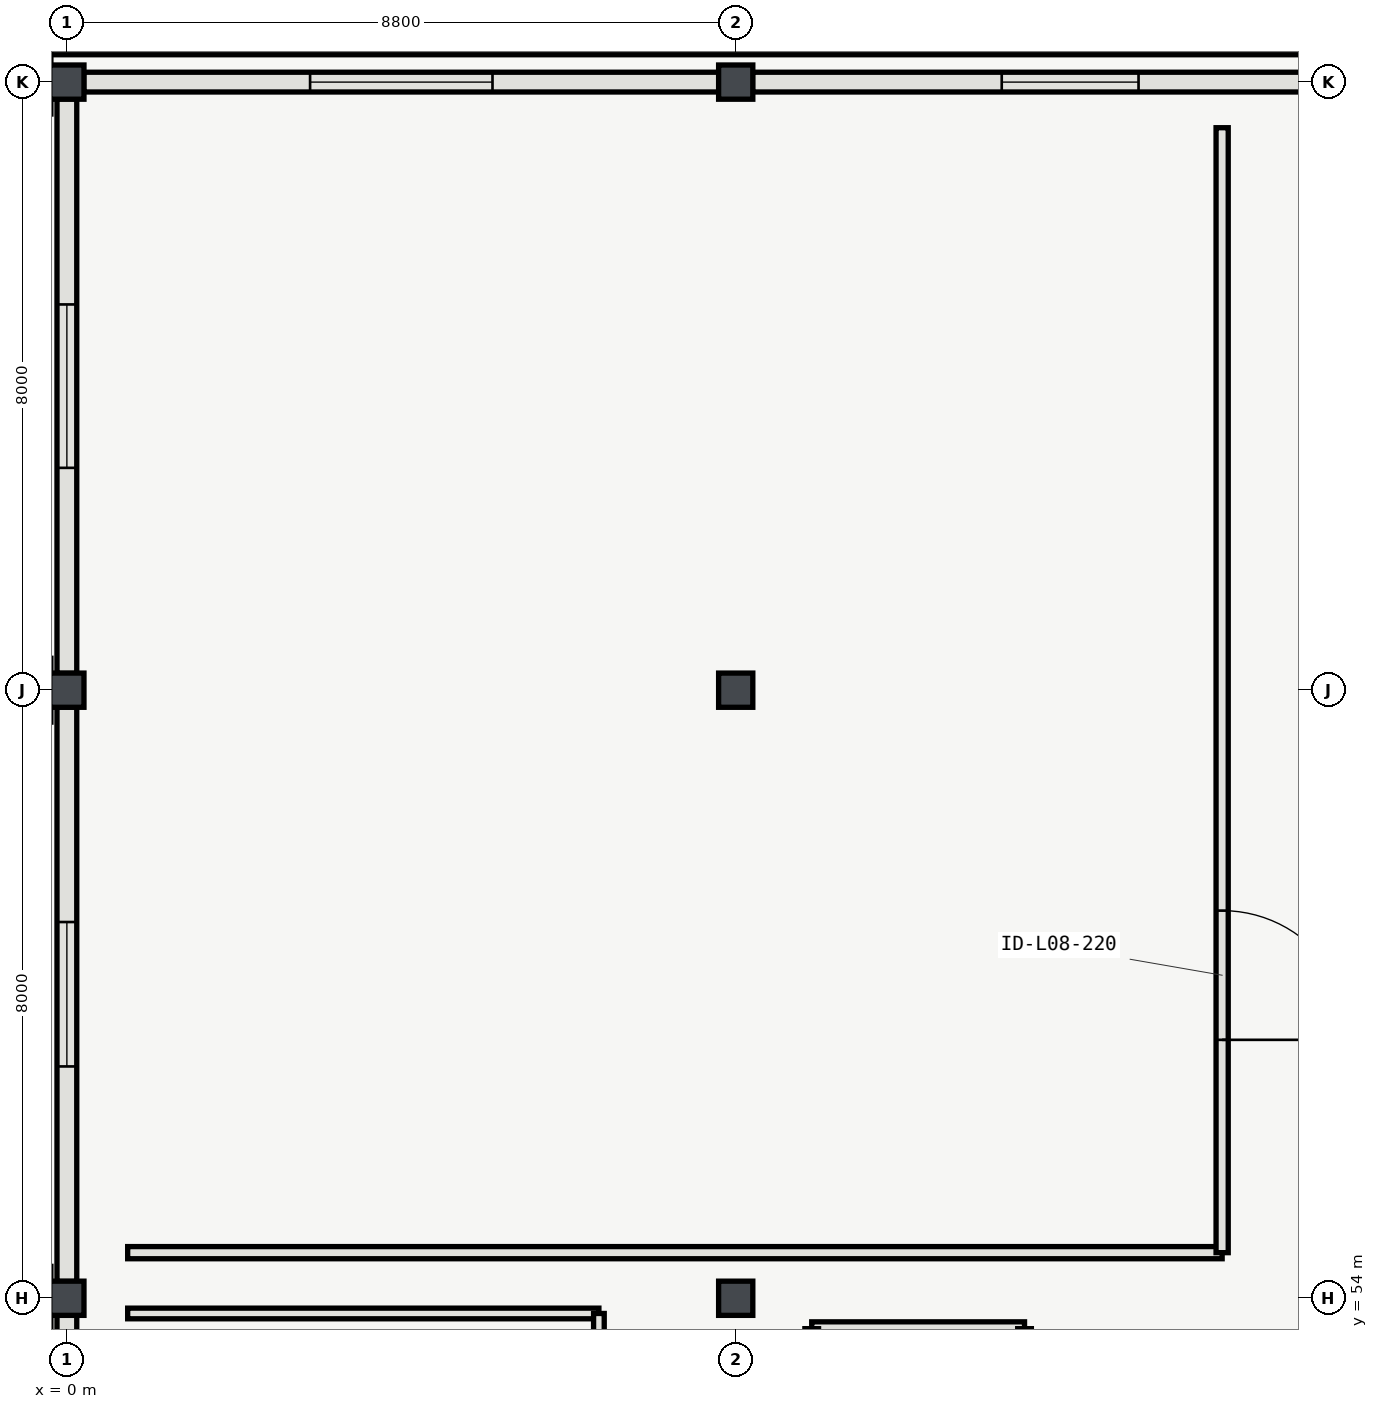
"""IFC4 building model, lengths in metres.
Left out: names, types, materials, properties, quantities, classifications, styles, units other than length and angle.
Written with IfcOpenShell. Run it as: python <this file> out.ifc"""

import sys

from ifc_helpers import new_model, si_unit, direction, frame, frame_2d, origin, origin_2d, place, context, subcontext, project, spatial, rectangle, hollow_rectangle, extrude, element, fill, save


model = new_model("IFC4")
c1 = context("Model", 3, precision=1e-05, world=origin(), true_north=direction((0.0, 1.0)))
c2 = subcontext(c1, "Body", "Model", "MODEL_VIEW")
j1 = project(units=[si_unit("LENGTHUNIT", "METRE"), si_unit("PLANEANGLEUNIT", "RADIAN")], contexts=[c1])
p1 = place(None, origin())
s1 = spatial("IfcSite", under=j1, at=p1, CompositionType="ELEMENT")
p2 = place(p1, origin())
s2 = spatial("IfcBuilding", under=s1, at=p2, CompositionType="ELEMENT")
p3 = place(p2, frame((0.0, 0.0, 37.2)))
s3 = spatial("IfcBuildingStorey", under=s2, at=p3, CompositionType="ELEMENT", Elevation=37.2)
for number, where, z_axis, x_axis in (
    (1, (0.0, 54.0, 0.0), (0.0, 0.0, 1.0), (1.0, 0.0, 0.0)),
    (2, (0.0, 62.0, 0.0), (0.0, 0.0, 1.0), (1.0, 0.0, 0.0)),
    (3, (0.0, 70.0, 0.0), (0.0, 0.0, 1.0), (1.0, 0.0, 0.0)),
    (4, (8.8, 54.0, 0.0), (0.0, 0.0, 1.0), (1.0, 0.0, 0.0)),
    (5, (8.8, 62.0, 0.0), (0.0, 0.0, 1.0), (1.0, 0.0, 0.0)),
    (6, (8.8, 70.0, 0.0), (0.0, 0.0, 1.0), (1.0, 0.0, 0.0)),
):
    element("IfcColumn", number, at=place(p3, frame(where, z_axis=z_axis, x_axis=x_axis)), inside=s3, PredefinedType="COLUMN", context=c2, shape_type="SweptSolid", body=[
        extrude(hollow_rectangle(XDim=0.45, YDim=0.45, WallThickness=0.018, InnerFilletRadius=0.018, OuterFilletRadius=0.036, at=origin_2d()), origin(), (0.0, 0.0, 1.0), 4.2),
    ])
p4 = place(p3, frame((8.579, 70.0, 0.0), z_axis=(0.0, 0.0, 1.0), x_axis=(-1.0, 0.0, 0.0)))
e7 = element("IfcWall", 7, at=p4, inside=s3, PredefinedType="SOLIDWALL", context=c2, shape_type="SweptSolid", body=[
    extrude(rectangle(XDim=8.358, YDim=0.26, at=frame_2d((4.179, 0.0))), origin(), (0.0, 0.0, 1.0), 3.483),
])
p5 = place(p4, frame((2.979, 0.0, 0.95)))
e8 = element("IfcOpeningElement", 8, at=p5, cuts=e7, PredefinedType="OPENING", context=c2, shape_type="SweptSolid", body=[
    extrude(rectangle(XDim=2.4, YDim=1.5, at=frame_2d((1.2, 0.75))), frame((0.0, 0.14, 0.0), z_axis=(0.0, -1.0, 0.0), x_axis=(1.0, 0.0, 0.0)), (0.0, 0.0, 1.0), 0.28),
])
p6 = place(p3, frame((17.304, 70.0, 0.0), z_axis=(0.0, 0.0, 1.0), x_axis=(-1.0, 0.0, 0.0)))
e9 = element("IfcWall", 9, at=p6, inside=s3, PredefinedType="SOLIDWALL", context=c2, shape_type="SweptSolid", body=[
    extrude(rectangle(XDim=8.283, YDim=0.26, at=frame_2d((4.142, 0.0))), origin(), (0.0, 0.0, 1.0), 3.483),
])
p7 = place(p6, frame((3.204, 0.0, 0.95)))
e10 = element("IfcOpeningElement", 10, at=p7, cuts=e9, PredefinedType="OPENING", context=c2, shape_type="SweptSolid", body=[
    extrude(rectangle(XDim=1.8, YDim=1.5, at=frame_2d((0.9, 0.75))), frame((0.0, 0.14, 0.0), z_axis=(0.0, -1.0, 0.0), x_axis=(1.0, 0.0, 0.0)), (0.0, 0.0, 1.0), 0.28),
])
p8 = place(p3, frame((0.0, 53.779, 0.0), z_axis=(0.0, 0.0, 1.0), x_axis=(0.0, -1.0, 0.0)))
e11 = element("IfcWall", 11, at=p8, inside=s3, PredefinedType="SOLIDWALL", context=c2, shape_type="SweptSolid", body=[
    extrude(rectangle(XDim=7.558, YDim=0.26, at=frame_2d((3.779, 0.0))), origin(), (0.0, 0.0, 1.0), 3.483),
])
p9 = place(p8, frame((2.904, 0.0, 0.95)))
e12 = element("IfcOpeningElement", 12, at=p9, cuts=e11, PredefinedType="OPENING", context=c2, shape_type="SweptSolid", body=[
    extrude(rectangle(XDim=1.75, YDim=1.6, at=frame_2d((0.875, 0.8))), frame((0.0, 0.14, 0.0), z_axis=(0.0, -1.0, 0.0), x_axis=(1.0, 0.0, 0.0)), (0.0, 0.0, 1.0), 0.28),
])
p10 = place(p3, frame((0.0, 61.779, 0.0), z_axis=(0.0, 0.0, 1.0), x_axis=(0.0, -1.0, 0.0)))
e13 = element("IfcWall", 13, at=p10, inside=s3, PredefinedType="SOLIDWALL", context=c2, shape_type="SweptSolid", body=[
    extrude(rectangle(XDim=7.558, YDim=0.26, at=frame_2d((3.779, 0.0))), origin(), (0.0, 0.0, 1.0), 3.483),
])
p11 = place(p10, frame((2.829, 0.0, 0.95)))
e14 = element("IfcOpeningElement", 14, at=p11, cuts=e13, PredefinedType="OPENING", context=c2, shape_type="SweptSolid", body=[
    extrude(rectangle(XDim=1.9, YDim=1.6, at=frame_2d((0.95, 0.8))), frame((0.0, 0.14, 0.0), z_axis=(0.0, -1.0, 0.0), x_axis=(1.0, 0.0, 0.0)), (0.0, 0.0, 1.0), 0.28),
])
p12 = place(p3, frame((0.0, 69.779, 0.0), z_axis=(0.0, 0.0, 1.0), x_axis=(0.0, -1.0, 0.0)))
e15 = element("IfcWall", 15, at=p12, inside=s3, PredefinedType="SOLIDWALL", context=c2, shape_type="SweptSolid", body=[
    extrude(rectangle(XDim=7.558, YDim=0.26, at=frame_2d((3.779, 0.0))), origin(), (0.0, 0.0, 1.0), 3.483),
])
p13 = place(p12, frame((2.704, 0.0, 0.95)))
e16 = element("IfcOpeningElement", 16, at=p13, cuts=e15, PredefinedType="OPENING", context=c2, shape_type="SweptSolid", body=[
    extrude(rectangle(XDim=2.15, YDim=1.6, at=frame_2d((1.075, 0.8))), frame((0.0, 0.14, 0.0), z_axis=(0.0, -1.0, 0.0), x_axis=(1.0, 0.0, 0.0)), (0.0, 0.0, 1.0), 0.28),
])
p14 = place(p3, frame((35.54, 70.44, 0.0), z_axis=(0.0, 0.0, 1.0), x_axis=(-1.0, 0.0, 0.0)))
e17 = element("IfcWall", 17, at=p14, inside=s3, PredefinedType="SOLIDWALL", context=c2, shape_type="SweptSolid", body=[
    extrude(rectangle(XDim=35.88, YDim=0.16, at=frame_2d((17.94, 0.0))), origin(), (0.0, 0.0, 1.0), 0.58),
])
p15 = place(p3, frame((12.6, 53.6, 0.0), z_axis=(0.0, 0.0, 1.0), x_axis=(-1.0, 0.0, 0.0)))
e18 = element("IfcWall", 18, at=p15, inside=s3, PredefinedType="PLUMBINGWALL", context=c2, shape_type="SweptSolid", body=[
    extrude(rectangle(XDim=2.8, YDim=0.18, at=frame_2d((1.4, 0.0))), origin(), (0.0, 0.0, 1.0), 3.92),
])
p16 = place(p3, frame((12.6, 50.2, 0.0), z_axis=(0.0, 0.0, 1.0), x_axis=(0.0, 1.0, 0.0)))
e19 = element("IfcWall", 19, at=p16, inside=s3, PredefinedType="PLUMBINGWALL", context=c2, shape_type="SweptSolid", body=[
    extrude(rectangle(XDim=3.4, YDim=0.18, at=frame_2d((1.7, 0.0))), origin(), (0.0, 0.0, 1.0), 3.92),
])
p17 = place(p16, frame((0.3, 0.0, 0.0)))
e20 = element("IfcOpeningElement", 20, at=p17, cuts=e19, PredefinedType="OPENING", context=c2, shape_type="SweptSolid", body=[
    extrude(rectangle(XDim=0.92, YDim=2.1, at=frame_2d((0.46, 1.05))), frame((0.0, 0.1, 0.0), z_axis=(0.0, -1.0, 0.0), x_axis=(1.0, 0.0, 0.0)), (0.0, 0.0, 1.0), 0.2),
])
p18 = place(p3, frame((0.8, 54.6, 0.0), z_axis=(0.0, 0.0, 1.0), x_axis=(1.0, 0.0, 0.0)))
e21 = element("IfcWall", 21, at=p18, inside=s3, PredefinedType="PARTITIONING", context=c2, shape_type="SweptSolid", body=[
    extrude(rectangle(XDim=14.4, YDim=0.16, at=frame_2d((7.2, 0.0))), origin(), (0.0, 0.0, 1.0), 3.92),
])
p19 = place(p3, frame((15.2, 54.6, 0.0), z_axis=(0.0, 0.0, 1.0), x_axis=(0.0, 1.0, 0.0)))
e22 = element("IfcWall", 22, at=p19, inside=s3, PredefinedType="PARTITIONING", context=c2, shape_type="SweptSolid", body=[
    extrude(rectangle(XDim=14.8, YDim=0.16, at=frame_2d((7.4, 0.0))), origin(), (0.0, 0.0, 1.0), 3.92),
])
p20 = place(p19, frame((2.8, 0.0, 0.0)))
e23 = element("IfcOpeningElement", 23, at=p20, cuts=e22, PredefinedType="OPENING", context=c2, shape_type="SweptSolid", body=[
    extrude(rectangle(XDim=1.7, YDim=2.3, at=frame_2d((0.85, 1.15))), frame((0.0, 0.09, 0.0), z_axis=(0.0, -1.0, 0.0), x_axis=(1.0, 0.0, 0.0)), (0.0, 0.0, 1.0), 0.18),
])
p21 = place(p3, frame((7.0, 53.8, 0.0), z_axis=(0.0, 0.0, 1.0), x_axis=(-1.0, 0.0, 0.0)))
e24 = element("IfcWall", 24, at=p21, inside=s3, PredefinedType="PARTITIONING", context=c2, shape_type="SweptSolid", body=[
    extrude(rectangle(XDim=6.2, YDim=0.14, at=frame_2d((3.1, 0.0))), origin(), (0.0, 0.0, 1.0), 3.486),
])
p22 = place(p3, frame((7.0, 43.6, 0.0), z_axis=(0.0, 0.0, 1.0), x_axis=(0.0, 1.0, 0.0)))
e25 = element("IfcWall", 25, at=p22, inside=s3, PredefinedType="PARTITIONING", context=c2, shape_type="SweptSolid", body=[
    extrude(rectangle(XDim=10.2, YDim=0.14, at=frame_2d((5.1, 0.0))), origin(), (0.0, 0.0, 1.0), 3.92),
])
p23 = place(p22, frame((6.334, 0.0, 0.0)))
e26 = element("IfcOpeningElement", 26, at=p23, cuts=e25, PredefinedType="OPENING", context=c2, shape_type="SweptSolid", body=[
    extrude(rectangle(XDim=0.98, YDim=2.15, at=frame_2d((0.49, 1.075))), frame((0.0, 0.08, 0.0), z_axis=(0.0, -1.0, 0.0), x_axis=(1.0, 0.0, 0.0)), (0.0, 0.0, 1.0), 0.16),
])
p24 = place(p5, origin())
e27 = element("IfcWindow", 27, at=p24, inside=s3, PartitioningType="SINGLE_PANEL", PredefinedType="WINDOW", context=c2, shape_type="SweptSolid", body=[
    extrude(rectangle(XDim=2.4, YDim=1.5, at=frame_2d((1.2, 0.75))), frame((0.0, 0.03, 0.0), z_axis=(0.0, -1.0, 0.0), x_axis=(1.0, 0.0, 0.0)), (0.0, 0.0, 1.0), 0.06),
])
fill(e8, e27)
p25 = place(p7, origin())
e28 = element("IfcWindow", 28, at=p25, inside=s3, PartitioningType="SINGLE_PANEL", PredefinedType="WINDOW", context=c2, shape_type="SweptSolid", body=[
    extrude(rectangle(XDim=1.8, YDim=1.5, at=frame_2d((0.9, 0.75))), frame((0.0, 0.03, 0.0), z_axis=(0.0, -1.0, 0.0), x_axis=(1.0, 0.0, 0.0)), (0.0, 0.0, 1.0), 0.06),
])
fill(e10, e28)
p26 = place(p11, origin())
e29 = element("IfcWindow", 29, at=p26, inside=s3, PartitioningType="SINGLE_PANEL", PredefinedType="WINDOW", context=c2, shape_type="SweptSolid", body=[
    extrude(rectangle(XDim=1.9, YDim=1.6, at=frame_2d((0.95, 0.8))), frame((0.0, 0.03, 0.0), z_axis=(0.0, -1.0, 0.0), x_axis=(1.0, 0.0, 0.0)), (0.0, 0.0, 1.0), 0.06),
])
fill(e14, e29)
p27 = place(p13, origin())
e30 = element("IfcWindow", 30, at=p27, inside=s3, PartitioningType="SINGLE_PANEL", PredefinedType="WINDOW", context=c2, shape_type="SweptSolid", body=[
    extrude(rectangle(XDim=2.15, YDim=1.6, at=frame_2d((1.075, 0.8))), frame((0.0, 0.03, 0.0), z_axis=(0.0, -1.0, 0.0), x_axis=(1.0, 0.0, 0.0)), (0.0, 0.0, 1.0), 0.06),
])
fill(e16, e30)
p28 = place(p20, origin())
e31 = element("IfcDoor", 31, at=p28, inside=s3, OperationType="DOUBLE_DOOR_SINGLE_SWING", PredefinedType="DOOR", context=c2, shape_type="SweptSolid", body=[
    extrude(rectangle(XDim=1.7, YDim=2.3, at=frame_2d((0.85, 1.15))), frame((0.0, 0.025, 0.0), z_axis=(0.0, -1.0, 0.0), x_axis=(1.0, 0.0, 0.0)), (0.0, 0.0, 1.0), 0.05),
])
fill(e23, e31)
save(model, sys.argv[1])
